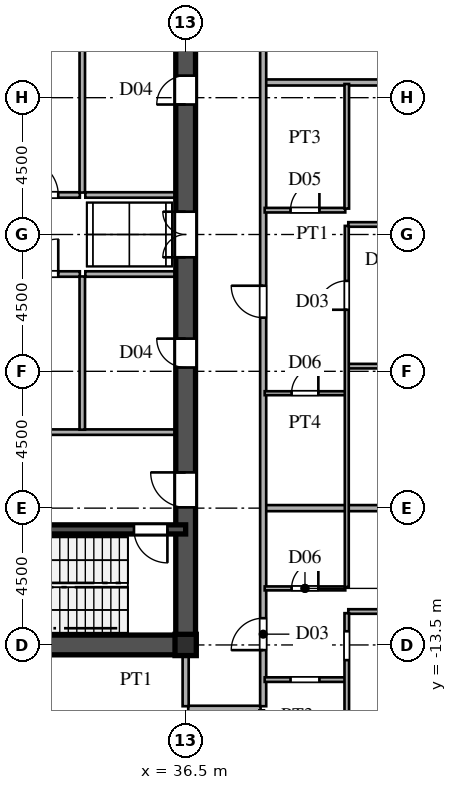
"""IFC4 building model, lengths in metres.
Left out: names, types, materials, properties, quantities, classifications, styles, units other than length and angle.
Written with IfcOpenShell. Run it as: python <this file> out.ifc"""

import sys

from ifc_helpers import new_model, si_unit, direction, frame, frame_2d, origin, origin_2d, place, context, subcontext, project, spatial, rectangle, i_section, extrude, source, transform, mapped, element, fill, save


model = new_model("IFC4")
c1 = context("Model", 3, precision=1e-05, world=origin(), true_north=direction((0.0, 1.0)))
c2 = subcontext(c1, "Body", "Model", "MODEL_VIEW")
j1 = project(units=[si_unit("LENGTHUNIT", "METRE"), si_unit("PLANEANGLEUNIT", "RADIAN")], contexts=[c1])
p1 = place(None, origin())
s1 = spatial("IfcSite", under=j1, at=p1, CompositionType="ELEMENT")
p2 = place(p1, origin())
s2 = spatial("IfcBuilding", under=s1, at=p2, CompositionType="ELEMENT")
p3 = place(p2, frame((0.0, 0.0, 128.4)))
s3 = spatial("IfcBuildingStorey", under=s2, at=p3, CompositionType="ELEMENT", Elevation=128.4)
m1 = source(origin(), c2, "Body", "SweptSolid", [
    extrude(i_section(OverallWidth=0.7, OverallDepth=0.7, WebThickness=0.028, FlangeThickness=0.045, at=origin_2d()), origin(), (0.0, 0.0, 1.0), 3.6),
])
p4 = place(p3, frame((36.5, -13.5, 0.0), z_axis=(0.0, 0.0, 1.0), x_axis=(1.0, 0.0, 0.0)))
e1 = element("IfcColumn", 1, at=p4, inside=s3, PredefinedType="COLUMN", context=c2, shape_type="MappedRepresentation", body=[
    mapped(m1, transform((0.0, 0.0, 0.0), scale=1.0)),
])
p5 = place(p3, frame((27.5, -13.5, 0.0), z_axis=(0.0, 0.0, 1.0), x_axis=(1.0, 0.0, 0.0)))
e2 = element("IfcWall", 2, at=p5, inside=s3, PredefinedType="SHEAR", context=c2, shape_type="SweptSolid", body=[
    extrude(rectangle(XDim=9.0, YDim=0.65, at=frame_2d((4.5, 0.0))), origin(), (0.0, 0.0, 1.0), 3.38),
])
p6 = place(p3, frame((36.5, -13.65, 0.0), z_axis=(0.0, 0.0, 1.0), x_axis=(0.0, 1.0, 0.0)))
e3 = element("IfcWall", 3, at=p6, inside=s3, PredefinedType="SHEAR", context=c2, shape_type="SweptSolid", body=[
    extrude(rectangle(XDim=7.15, YDim=0.65, at=frame_2d((3.575, 0.0))), origin(), (0.0, 0.0, 1.0), 3.38),
])
p7 = place(p6, frame((4.675, 0.0, 0.0)))
e4 = element("IfcOpeningElement", 4, at=p7, cuts=e3, PredefinedType="OPENING", context=c2, shape_type="SweptSolid", body=[
    extrude(rectangle(XDim=1.15, YDim=2.2, at=frame_2d((0.575, 1.1))), frame((0.0, 0.335, 0.0), z_axis=(0.0, -1.0, 0.0), x_axis=(1.0, 0.0, 0.0)), (0.0, 0.0, 1.0), 0.67),
])
p8 = place(p3, frame((36.5, -1.3, 0.0), z_axis=(0.0, 0.0, 1.0), x_axis=(0.0, 1.0, 0.0)))
e5 = element("IfcWall", 5, at=p8, inside=s3, PredefinedType="SHEAR", context=c2, shape_type="SweptSolid", body=[
    extrude(rectangle(XDim=2.6, YDim=0.65, at=frame_2d((1.3, 0.0))), origin(), (0.0, 0.0, 1.0), 3.38),
])
p9 = place(p8, frame((0.55, 0.0, 0.0)))
e6 = element("IfcOpeningElement", 6, at=p9, cuts=e5, PredefinedType="OPENING", context=c2, shape_type="SweptSolid", body=[
    extrude(rectangle(XDim=1.5, YDim=2.3, at=frame_2d((0.75, 1.15))), frame((0.0, 0.335, 0.0), z_axis=(0.0, -1.0, 0.0), x_axis=(1.0, 0.0, 0.0)), (0.0, 0.0, 1.0), 0.67),
])
p10 = place(p3, frame((36.5, -6.5, 0.0), z_axis=(0.0, 0.0, 1.0), x_axis=(0.0, 1.0, 0.0)))
e7 = element("IfcWall", 7, at=p10, inside=s3, PredefinedType="SHEAR", context=c2, shape_type="SweptSolid", body=[
    extrude(rectangle(XDim=5.2, YDim=0.65, at=frame_2d((2.6, 0.0))), origin(), (0.0, 0.0, 1.0), 3.38),
])
p11 = place(p10, frame((2.125, 0.0, 0.0)))
e8 = element("IfcOpeningElement", 8, at=p11, cuts=e7, PredefinedType="OPENING", context=c2, shape_type="SweptSolid", body=[
    extrude(rectangle(XDim=0.95, YDim=2.15, at=frame_2d((0.475, 1.075))), frame((0.0, 0.335, 0.0), z_axis=(0.0, -1.0, 0.0), x_axis=(1.0, 0.0, 0.0)), (0.0, 0.0, 1.0), 0.67),
])
p12 = place(p3, frame((36.5, 1.3, 0.0), z_axis=(0.0, 0.0, 1.0), x_axis=(0.0, 1.0, 0.0)))
e9 = element("IfcWall", 9, at=p12, inside=s3, PredefinedType="SHEAR", context=c2, shape_type="SweptSolid", body=[
    extrude(rectangle(XDim=6.9, YDim=0.65, at=frame_2d((3.45, 0.0))), origin(), (0.0, 0.0, 1.0), 3.38),
])
p13 = place(p12, frame((2.975, 0.0, 0.0)))
e10 = element("IfcOpeningElement", 10, at=p13, cuts=e9, PredefinedType="OPENING", context=c2, shape_type="SweptSolid", body=[
    extrude(rectangle(XDim=0.95, YDim=2.15, at=frame_2d((0.475, 1.075))), frame((0.0, 0.335, 0.0), z_axis=(0.0, -1.0, 0.0), x_axis=(1.0, 0.0, 0.0)), (0.0, 0.0, 1.0), 0.67),
])
p14 = place(p3, frame((27.5, -9.7, 0.0), z_axis=(0.0, 0.0, 1.0), x_axis=(1.0, 0.0, 0.0)))
e11 = element("IfcWall", 11, at=p14, inside=s3, PredefinedType="SHEAR", context=c2, shape_type="SweptSolid", body=[
    extrude(rectangle(XDim=9.0, YDim=0.3, at=frame_2d((4.5, 0.0))), origin(), (0.0, 0.0, 1.0), 3.38),
])
p15 = place(p14, frame((7.3, 0.0, 0.0)))
e12 = element("IfcOpeningElement", 12, at=p15, cuts=e11, PredefinedType="OPENING", context=c2, shape_type="SweptSolid", body=[
    extrude(rectangle(XDim=1.1, YDim=2.2, at=frame_2d((0.55, 1.1))), frame((0.0, 0.16, 0.0), z_axis=(0.0, -1.0, 0.0), x_axis=(1.0, 0.0, 0.0)), (0.0, 0.0, 1.0), 0.32),
])
p16 = place(p3, frame((30.45, -6.5, 0.0), z_axis=(0.0, 0.0, 1.0), x_axis=(1.0, 0.0, 0.0)))
e13 = element("IfcWall", 13, at=p16, inside=s3, PredefinedType="PARTITIONING", context=c2, shape_type="SweptSolid", body=[
    extrude(rectangle(XDim=5.7, YDim=0.18, at=frame_2d((2.85, 0.0))), origin(), (0.0, 0.0, 1.0), 3.38),
])
p17 = place(p3, frame((33.1, -6.42, 0.0), z_axis=(0.0, 0.0, 1.0), x_axis=(0.0, 1.0, 0.0)))
e14 = element("IfcWall", 14, at=p17, inside=s3, PredefinedType="PARTITIONING", context=c2, shape_type="SweptSolid", body=[
    extrude(rectangle(XDim=5.04, YDim=0.18, at=frame_2d((2.52, 0.0))), origin(), (0.0, 0.0, 1.0), 3.38),
])
p18 = place(p3, frame((33.1, 1.38, 0.0), z_axis=(0.0, 0.0, 1.0), x_axis=(0.0, 1.0, 0.0)))
e15 = element("IfcWall", 15, at=p18, inside=s3, PredefinedType="PARTITIONING", context=c2, shape_type="SweptSolid", body=[
    extrude(rectangle(XDim=6.74, YDim=0.18, at=frame_2d((3.37, 0.0))), origin(), (0.0, 0.0, 1.0), 3.38),
])
p19 = place(p3, frame((30.45, -1.3, 0.0), z_axis=(0.0, 0.0, 1.0), x_axis=(1.0, 0.0, 0.0)))
e16 = element("IfcWall", 16, at=p19, inside=s3, PredefinedType="PARTITIONING", context=c2, shape_type="SweptSolid", body=[
    extrude(rectangle(XDim=2.57, YDim=0.18, at=frame_2d((1.285, 0.0))), origin(), (0.0, 0.0, 1.0), 3.38),
])
p20 = place(p19, frame((0.71, 0.0, 0.0)))
e17 = element("IfcOpeningElement", 17, at=p20, cuts=e16, PredefinedType="OPENING", context=c2, shape_type="SweptSolid", body=[
    extrude(rectangle(XDim=1.15, YDim=2.2, at=frame_2d((0.575, 1.1))), frame((0.0, 0.1, 0.0), z_axis=(0.0, -1.0, 0.0), x_axis=(1.0, 0.0, 0.0)), (0.0, 0.0, 1.0), 0.2),
])
p21 = place(p3, frame((30.45, 1.3, 0.0), z_axis=(0.0, 0.0, 1.0), x_axis=(1.0, 0.0, 0.0)))
e18 = element("IfcWall", 18, at=p21, inside=s3, PredefinedType="PARTITIONING", context=c2, shape_type="SweptSolid", body=[
    extrude(rectangle(XDim=2.57, YDim=0.18, at=frame_2d((1.285, 0.0))), origin(), (0.0, 0.0, 1.0), 3.38),
])
p22 = place(p21, frame((0.71, 0.0, 0.0)))
e19 = element("IfcOpeningElement", 19, at=p22, cuts=e18, PredefinedType="OPENING", context=c2, shape_type="SweptSolid", body=[
    extrude(rectangle(XDim=1.15, YDim=2.2, at=frame_2d((0.575, 1.1))), frame((0.0, 0.1, 0.0), z_axis=(0.0, -1.0, 0.0), x_axis=(1.0, 0.0, 0.0)), (0.0, 0.0, 1.0), 0.2),
])
for number, where, z_axis, x_axis in (
    (20, (33.2, -1.3, 0.0), (0.0, 0.0, 1.0), (1.0, 0.0, 0.0)),
    (21, (33.2, 1.3, 0.0), (0.0, 0.0, 1.0), (1.0, 0.0, 0.0)),
):
    element("IfcWall", number, at=place(p3, frame(where, z_axis=z_axis, x_axis=x_axis)), inside=s3, PredefinedType="PARTITIONING", context=c2, shape_type="SweptSolid", body=[
        extrude(rectangle(XDim=2.95, YDim=0.18, at=frame_2d((1.475, 0.0))), origin(), (0.0, 0.0, 1.0), 3.38),
    ])
p23 = place(p3, frame((36.585, -15.6, 0.0), z_axis=(0.0, 0.0, 1.0), x_axis=(1.0, 0.0, 0.0)))
e22 = element("IfcWall", 22, at=p23, inside=s3, PredefinedType="PARTITIONING", context=c2, shape_type="SweptSolid", body=[
    extrude(rectangle(XDim=2.38, YDim=0.2, at=frame_2d((1.19, 0.0))), origin(), (0.0, 0.0, 1.0), 3.38),
])
p24 = place(p3, frame((39.1, -14.64, 0.0), z_axis=(0.0, 0.0, 1.0), x_axis=(1.0, 0.0, 0.0)))
e23 = element("IfcWall", 23, at=p24, inside=s3, PredefinedType="PARTITIONING", context=c2, shape_type="SweptSolid", body=[
    extrude(rectangle(XDim=2.65, YDim=0.15, at=frame_2d((1.325, 0.0))), origin(), (0.0, 0.0, 1.0), 3.38),
])
p25 = place(p24, frame((0.85, 0.0, 0.0)))
e24 = element("IfcOpeningElement", 24, at=p25, cuts=e23, PredefinedType="OPENING", context=c2, shape_type="SweptSolid", body=[
    extrude(rectangle(XDim=0.95, YDim=2.15, at=frame_2d((0.475, 1.075))), frame((0.0, 0.085, 0.0), z_axis=(0.0, -1.0, 0.0), x_axis=(1.0, 0.0, 0.0)), (0.0, 0.0, 1.0), 0.17),
])
p26 = place(p3, frame((41.85, -12.4, 0.0), z_axis=(0.0, 0.0, 1.0), x_axis=(1.0, 0.0, 0.0)))
e25 = element("IfcWall", 25, at=p26, inside=s3, PredefinedType="PARTITIONING", context=c2, shape_type="SweptSolid", body=[
    extrude(rectangle(XDim=12.6, YDim=0.15, at=frame_2d((6.3, 0.0))), origin(), (0.0, 0.0, 1.0), 3.38),
])
p27 = place(p26, frame((5.825, 0.0, 0.0)))
e26 = element("IfcOpeningElement", 26, at=p27, cuts=e25, PredefinedType="OPENING", context=c2, shape_type="SweptSolid", body=[
    extrude(rectangle(XDim=0.95, YDim=2.15, at=frame_2d((0.475, 1.075))), frame((0.0, 0.085, 0.0), z_axis=(0.0, -1.0, 0.0), x_axis=(1.0, 0.0, 0.0)), (0.0, 0.0, 1.0), 0.17),
])
p28 = place(p3, frame((39.1, -11.64, 0.0), z_axis=(0.0, 0.0, 1.0), x_axis=(1.0, 0.0, 0.0)))
e27 = element("IfcWall", 27, at=p28, inside=s3, PredefinedType="PARTITIONING", context=c2, shape_type="SweptSolid", body=[
    extrude(rectangle(XDim=2.65, YDim=0.13, at=frame_2d((1.325, 0.0))), origin(), (0.0, 0.0, 1.0), 3.38),
])
p29 = place(p28, frame((0.885, 0.0, 0.0)))
e28 = element("IfcOpeningElement", 28, at=p29, cuts=e27, PredefinedType="OPENING", context=c2, shape_type="SweptSolid", body=[
    extrude(rectangle(XDim=0.88, YDim=2.1, at=frame_2d((0.44, 1.05))), frame((0.0, 0.075, 0.0), z_axis=(0.0, -1.0, 0.0), x_axis=(1.0, 0.0, 0.0)), (0.0, 0.0, 1.0), 0.15),
])
p30 = place(p3, frame((39.13, -9.0, 0.0), z_axis=(0.0, 0.0, 1.0), x_axis=(1.0, 0.0, 0.0)))
e29 = element("IfcWall", 29, at=p30, inside=s3, PredefinedType="PARTITIONING", context=c2, shape_type="SweptSolid", body=[
    extrude(rectangle(XDim=22.586, YDim=0.2, at=frame_2d((11.293, 0.0))), origin(), (0.0, 0.0, 1.0), 3.38),
])
p31 = place(p3, frame((39.1, -5.22, 0.0), z_axis=(0.0, 0.0, 1.0), x_axis=(1.0, 0.0, 0.0)))
e30 = element("IfcWall", 30, at=p31, inside=s3, PredefinedType="PARTITIONING", context=c2, shape_type="SweptSolid", body=[
    extrude(rectangle(XDim=2.65, YDim=0.13, at=frame_2d((1.325, 0.0))), origin(), (0.0, 0.0, 1.0), 3.38),
])
p32 = place(p31, frame((0.885, 0.0, 0.0)))
e31 = element("IfcOpeningElement", 31, at=p32, cuts=e30, PredefinedType="OPENING", context=c2, shape_type="SweptSolid", body=[
    extrude(rectangle(XDim=0.88, YDim=2.1, at=frame_2d((0.44, 1.05))), frame((0.0, 0.075, 0.0), z_axis=(0.0, -1.0, 0.0), x_axis=(1.0, 0.0, 0.0)), (0.0, 0.0, 1.0), 0.15),
])
p33 = place(p3, frame((41.85, -4.33, 0.0), z_axis=(0.0, 0.0, 1.0), x_axis=(1.0, 0.0, 0.0)))
e32 = element("IfcWall", 32, at=p33, inside=s3, PredefinedType="PARTITIONING", context=c2, shape_type="SweptSolid", body=[
    extrude(rectangle(XDim=27.525, YDim=0.15, at=frame_2d((13.762, 0.0))), origin(), (0.0, 0.0, 1.0), 3.38),
])
p34 = place(p33, frame((2.214, 0.0, 0.0)))
e33 = element("IfcOpeningElement", 33, at=p34, cuts=e32, PredefinedType="OPENING", context=c2, shape_type="SweptSolid", body=[
    extrude(rectangle(XDim=0.95, YDim=2.15, at=frame_2d((0.475, 1.075))), frame((0.0, 0.085, 0.0), z_axis=(0.0, -1.0, 0.0), x_axis=(1.0, 0.0, 0.0)), (0.0, 0.0, 1.0), 0.17),
])
p35 = place(p33, frame((15.025, 0.0, 0.0)))
e34 = element("IfcOpeningElement", 34, at=p35, cuts=e32, PredefinedType="OPENING", context=c2, shape_type="SweptSolid", body=[
    extrude(rectangle(XDim=0.95, YDim=2.15, at=frame_2d((0.475, 1.075))), frame((0.0, 0.085, 0.0), z_axis=(0.0, -1.0, 0.0), x_axis=(1.0, 0.0, 0.0)), (0.0, 0.0, 1.0), 0.17),
])
p36 = place(p3, frame((41.85, 0.33, 0.0), z_axis=(0.0, 0.0, 1.0), x_axis=(1.0, 0.0, 0.0)))
e35 = element("IfcWall", 35, at=p36, inside=s3, PredefinedType="PARTITIONING", context=c2, shape_type="SweptSolid", body=[
    extrude(rectangle(XDim=27.685, YDim=0.15, at=frame_2d((13.842, 0.0))), origin(), (0.0, 0.0, 1.0), 3.38),
])
p37 = place(p36, frame((2.65, 0.0, 0.0)))
e36 = element("IfcOpeningElement", 36, at=p37, cuts=e35, PredefinedType="OPENING", context=c2, shape_type="SweptSolid", body=[
    extrude(rectangle(XDim=0.95, YDim=2.15, at=frame_2d((0.475, 1.075))), frame((0.0, 0.085, 0.0), z_axis=(0.0, -1.0, 0.0), x_axis=(1.0, 0.0, 0.0)), (0.0, 0.0, 1.0), 0.17),
])
p38 = place(p36, frame((15.025, 0.0, 0.0)))
e37 = element("IfcOpeningElement", 37, at=p38, cuts=e35, PredefinedType="OPENING", context=c2, shape_type="SweptSolid", body=[
    extrude(rectangle(XDim=0.95, YDim=2.15, at=frame_2d((0.475, 1.075))), frame((0.0, 0.085, 0.0), z_axis=(0.0, -1.0, 0.0), x_axis=(1.0, 0.0, 0.0)), (0.0, 0.0, 1.0), 0.17),
])
p39 = place(p3, frame((39.1, 0.8, 0.0), z_axis=(0.0, 0.0, 1.0), x_axis=(1.0, 0.0, 0.0)))
e38 = element("IfcWall", 38, at=p39, inside=s3, PredefinedType="PARTITIONING", context=c2, shape_type="SweptSolid", body=[
    extrude(rectangle(XDim=2.65, YDim=0.15, at=frame_2d((1.325, 0.0))), origin(), (0.0, 0.0, 1.0), 3.38),
])
p40 = place(p39, frame((0.85, 0.0, 0.0)))
e39 = element("IfcOpeningElement", 39, at=p40, cuts=e38, PredefinedType="OPENING", context=c2, shape_type="SweptSolid", body=[
    extrude(rectangle(XDim=0.95, YDim=2.15, at=frame_2d((0.475, 1.075))), frame((0.0, 0.085, 0.0), z_axis=(0.0, -1.0, 0.0), x_axis=(1.0, 0.0, 0.0)), (0.0, 0.0, 1.0), 0.17),
])
p41 = place(p3, frame((39.13, 5.0, 0.0), z_axis=(0.0, 0.0, 1.0), x_axis=(1.0, 0.0, 0.0)))
e40 = element("IfcWall", 40, at=p41, inside=s3, PredefinedType="PARTITIONING", context=c2, shape_type="SweptSolid", body=[
    extrude(rectangle(XDim=30.096, YDim=0.2, at=frame_2d((15.048, 0.0))), origin(), (0.0, 0.0, 1.0), 3.38),
])
p42 = place(p3, frame((36.5, -15.515, 0.0), z_axis=(0.0, 0.0, 1.0), x_axis=(0.0, 1.0, 0.0)))
e41 = element("IfcWall", 41, at=p42, inside=s3, PredefinedType="PARTITIONING", context=c2, shape_type="SweptSolid", body=[
    extrude(rectangle(XDim=1.685, YDim=0.2, at=frame_2d((0.842, 0.0))), origin(), (0.0, 0.0, 1.0), 2.78),
])
p43 = place(p3, frame((39.05, -15.515, 0.0), z_axis=(0.0, 0.0, 1.0), x_axis=(0.0, 1.0, 0.0)))
e42 = element("IfcWall", 42, at=p43, inside=s3, PredefinedType="PARTITIONING", context=c2, shape_type="SweptSolid", body=[
    extrude(rectangle(XDim=31.03, YDim=0.2, at=frame_2d((15.515, 0.0))), origin(), (0.0, 0.0, 1.0), 3.38),
])
p44 = place(p43, frame((1.845, 0.0, 0.0)))
e43 = element("IfcOpeningElement", 43, at=p44, cuts=e42, PredefinedType="OPENING", context=c2, shape_type="SweptSolid", body=[
    extrude(rectangle(XDim=1.05, YDim=2.25, at=frame_2d((0.525, 1.125))), frame((0.0, 0.11, 0.0), z_axis=(0.0, -1.0, 0.0), x_axis=(1.0, 0.0, 0.0)), (0.0, 0.0, 1.0), 0.22),
])
p45 = place(p43, frame((12.78, 0.0, 0.0)))
e44 = element("IfcOpeningElement", 44, at=p45, cuts=e42, PredefinedType="OPENING", context=c2, shape_type="SweptSolid", body=[
    extrude(rectangle(XDim=1.05, YDim=2.25, at=frame_2d((0.525, 1.125))), frame((0.0, 0.11, 0.0), z_axis=(0.0, -1.0, 0.0), x_axis=(1.0, 0.0, 0.0)), (0.0, 0.0, 1.0), 0.22),
])
p46 = place(p43, frame((25.29, 0.0, 0.0)))
e45 = element("IfcOpeningElement", 45, at=p46, cuts=e42, PredefinedType="OPENING", context=c2, shape_type="SweptSolid", body=[
    extrude(rectangle(XDim=1.05, YDim=2.25, at=frame_2d((0.525, 1.125))), frame((0.0, 0.11, 0.0), z_axis=(0.0, -1.0, 0.0), x_axis=(1.0, 0.0, 0.0)), (0.0, 0.0, 1.0), 0.22),
])
p47 = place(p3, frame((41.8, -19.25, 0.0), z_axis=(0.0, 0.0, 1.0), x_axis=(0.0, 1.0, 0.0)))
e46 = element("IfcWall", 46, at=p47, inside=s3, PredefinedType="PARTITIONING", context=c2, shape_type="SweptSolid", body=[
    extrude(rectangle(XDim=6.795, YDim=0.15, at=frame_2d((3.397, 0.0))), origin(), (0.0, 0.0, 1.0), 3.38),
])
p48 = place(p47, frame((5.25, 0.0, 0.0)))
e47 = element("IfcOpeningElement", 47, at=p48, cuts=e46, PredefinedType="OPENING", context=c2, shape_type="SweptSolid", body=[
    extrude(rectangle(XDim=0.95, YDim=2.15, at=frame_2d((0.475, 1.075))), frame((0.0, 0.085, 0.0), z_axis=(0.0, -1.0, 0.0), x_axis=(1.0, 0.0, 0.0)), (0.0, 0.0, 1.0), 0.17),
])
p49 = place(p3, frame((41.8, -11.595, 0.0), z_axis=(0.0, 0.0, 1.0), x_axis=(0.0, 1.0, 0.0)))
e48 = element("IfcWall", 48, at=p49, inside=s3, PredefinedType="PARTITIONING", context=c2, shape_type="SweptSolid", body=[
    extrude(rectangle(XDim=11.878, YDim=0.13, at=frame_2d((5.939, 0.0))), origin(), (0.0, 0.0, 1.0), 3.38),
])
p50 = place(p49, frame((9.12, 0.0, 0.0)))
e49 = element("IfcOpeningElement", 49, at=p50, cuts=e48, PredefinedType="OPENING", context=c2, shape_type="SweptSolid", body=[
    extrude(rectangle(XDim=0.95, YDim=2.15, at=frame_2d((0.475, 1.075))), frame((0.0, 0.075, 0.0), z_axis=(0.0, -1.0, 0.0), x_axis=(1.0, 0.0, 0.0)), (0.0, 0.0, 1.0), 0.15),
])
p51 = place(p3, frame((41.8, 0.852, 0.0), z_axis=(0.0, 0.0, 1.0), x_axis=(0.0, 1.0, 0.0)))
e50 = element("IfcWall", 50, at=p51, inside=s3, PredefinedType="PARTITIONING", context=c2, shape_type="SweptSolid", body=[
    extrude(rectangle(XDim=4.098, YDim=0.15, at=frame_2d((2.049, 0.0))), origin(), (0.0, 0.0, 1.0), 3.38),
])
m2 = source(origin(), c2, "Body", "SweptSolid", [
    extrude(rectangle(XDim=1.15, YDim=2.2, at=frame_2d((0.575, 1.1))), frame((0.0, 0.025, 0.0), z_axis=(0.0, -1.0, 0.0), x_axis=(1.0, 0.0, 0.0)), (0.0, 0.0, 1.0), 0.05),
])
p52 = place(p7, origin())
e51 = element("IfcDoor", 51, at=p52, inside=s3, OperationType="SINGLE_SWING_RIGHT", PredefinedType="DOOR", context=c2, shape_type="MappedRepresentation", body=[
    mapped(m2, transform((0.0, 0.0, 0.0), scale=1.0)),
])
fill(e4, e51)
m3 = source(origin(), c2, "Body", "SweptSolid", [
    extrude(rectangle(XDim=1.5, YDim=2.3, at=frame_2d((0.75, 1.15))), frame((0.0, 0.025, 0.0), z_axis=(0.0, -1.0, 0.0), x_axis=(1.0, 0.0, 0.0)), (0.0, 0.0, 1.0), 0.05),
])
p53 = place(p9, origin())
e52 = element("IfcDoor", 52, at=p53, inside=s3, OperationType="DOUBLE_SWING_LEFT", PredefinedType="DOOR", context=c2, shape_type="MappedRepresentation", body=[
    mapped(m3, transform((0.0, 0.0, 0.0), scale=1.0)),
])
fill(e6, e52)
m4 = source(origin(), c2, "Body", "SweptSolid", [
    extrude(rectangle(XDim=0.95, YDim=2.15, at=frame_2d((0.475, 1.075))), frame((0.0, 0.025, 0.0), z_axis=(0.0, -1.0, 0.0), x_axis=(1.0, 0.0, 0.0)), (0.0, 0.0, 1.0), 0.05),
])
p54 = place(p11, origin())
e53 = element("IfcDoor", 53, at=p54, inside=s3, OperationType="SINGLE_SWING_RIGHT", PredefinedType="DOOR", context=c2, shape_type="MappedRepresentation", body=[
    mapped(m4, transform((0.0, 0.0, 0.0), scale=1.0)),
])
fill(e8, e53)
p55 = place(p13, origin())
e54 = element("IfcDoor", 54, at=p55, inside=s3, OperationType="SINGLE_SWING_LEFT", PredefinedType="DOOR", context=c2, shape_type="MappedRepresentation", body=[
    mapped(m4, transform((0.0, 0.0, 0.0), scale=1.0)),
])
fill(e10, e54)
m5 = source(origin(), c2, "Body", "SweptSolid", [
    extrude(rectangle(XDim=1.1, YDim=2.2, at=frame_2d((0.55, 1.1))), frame((0.0, 0.025, 0.0), z_axis=(0.0, -1.0, 0.0), x_axis=(1.0, 0.0, 0.0)), (0.0, 0.0, 1.0), 0.05),
])
p56 = place(p15, frame((1.1, 0.0, 0.0), z_axis=(0.0, 0.0, 1.0), x_axis=(-1.0, 0.0, 0.0)))
e55 = element("IfcDoor", 55, at=p56, inside=s3, OperationType="SINGLE_SWING_RIGHT", PredefinedType="DOOR", context=c2, shape_type="MappedRepresentation", body=[
    mapped(m5, transform((0.0, 0.0, 0.0), scale=1.0)),
])
fill(e12, e55)
p57 = place(p20, origin())
e56 = element("IfcDoor", 56, at=p57, inside=s3, OperationType="SINGLE_SWING_RIGHT", PredefinedType="DOOR", context=c2, shape_type="MappedRepresentation", body=[
    mapped(m2, transform((0.0, 0.0, 0.0), scale=1.0)),
])
fill(e17, e56)
p58 = place(p22, origin())
e57 = element("IfcDoor", 57, at=p58, inside=s3, OperationType="SINGLE_SWING_LEFT", PredefinedType="DOOR", context=c2, shape_type="MappedRepresentation", body=[
    mapped(m2, transform((0.0, 0.0, 0.0), scale=1.0)),
])
fill(e19, e57)
m6 = source(origin(), c2, "Body", "SweptSolid", [
    extrude(rectangle(XDim=0.88, YDim=2.1, at=frame_2d((0.44, 1.05))), frame((0.0, 0.025, 0.0), z_axis=(0.0, -1.0, 0.0), x_axis=(1.0, 0.0, 0.0)), (0.0, 0.0, 1.0), 0.05),
])
p59 = place(p29, origin())
e58 = element("IfcDoor", 58, at=p59, inside=s3, OperationType="SINGLE_SWING_RIGHT", PredefinedType="DOOR", context=c2, shape_type="MappedRepresentation", body=[
    mapped(m6, transform((0.0, 0.0, 0.0), scale=1.0)),
])
fill(e28, e58)
p60 = place(p32, origin())
e59 = element("IfcDoor", 59, at=p60, inside=s3, OperationType="SINGLE_SWING_RIGHT", PredefinedType="DOOR", context=c2, shape_type="MappedRepresentation", body=[
    mapped(m6, transform((0.0, 0.0, 0.0), scale=1.0)),
])
fill(e31, e59)
m7 = source(origin(), c2, "Body", "SweptSolid", [
    extrude(rectangle(XDim=0.95, YDim=2.15, at=frame_2d((0.475, 1.075))), frame((0.0, 0.025, 0.0), z_axis=(0.0, -1.0, 0.0), x_axis=(1.0, 0.0, 0.0)), (0.0, 0.0, 1.0), 0.05),
])
p61 = place(p40, origin())
e60 = element("IfcDoor", 60, at=p61, inside=s3, OperationType="SINGLE_SWING_RIGHT", PredefinedType="DOOR", context=c2, shape_type="MappedRepresentation", body=[
    mapped(m7, transform((0.0, 0.0, 0.0), scale=1.0)),
])
fill(e39, e60)
m8 = source(origin(), c2, "Body", "SweptSolid", [
    extrude(rectangle(XDim=1.05, YDim=2.25, at=frame_2d((0.525, 1.125))), frame((0.0, 0.025, 0.0), z_axis=(0.0, -1.0, 0.0), x_axis=(1.0, 0.0, 0.0)), (0.0, 0.0, 1.0), 0.05),
])
p62 = place(p44, origin())
e61 = element("IfcDoor", 61, at=p62, inside=s3, OperationType="SINGLE_SWING_LEFT", PredefinedType="DOOR", context=c2, shape_type="MappedRepresentation", body=[
    mapped(m8, transform((0.0, 0.0, 0.0), scale=1.0)),
])
fill(e43, e61)
p63 = place(p45, origin())
e62 = element("IfcDoor", 62, at=p63, inside=s3, OperationType="SINGLE_SWING_RIGHT", PredefinedType="DOOR", context=c2, shape_type="MappedRepresentation", body=[
    mapped(m8, transform((0.0, 0.0, 0.0), scale=1.0)),
])
fill(e44, e62)
p64 = place(p50, origin())
e63 = element("IfcDoor", 63, at=p64, inside=s3, OperationType="SINGLE_SWING_LEFT", PredefinedType="DOOR", context=c2, shape_type="MappedRepresentation", body=[
    mapped(m7, transform((0.0, 0.0, 0.0), scale=1.0)),
])
fill(e49, e63)
save(model, sys.argv[1])
